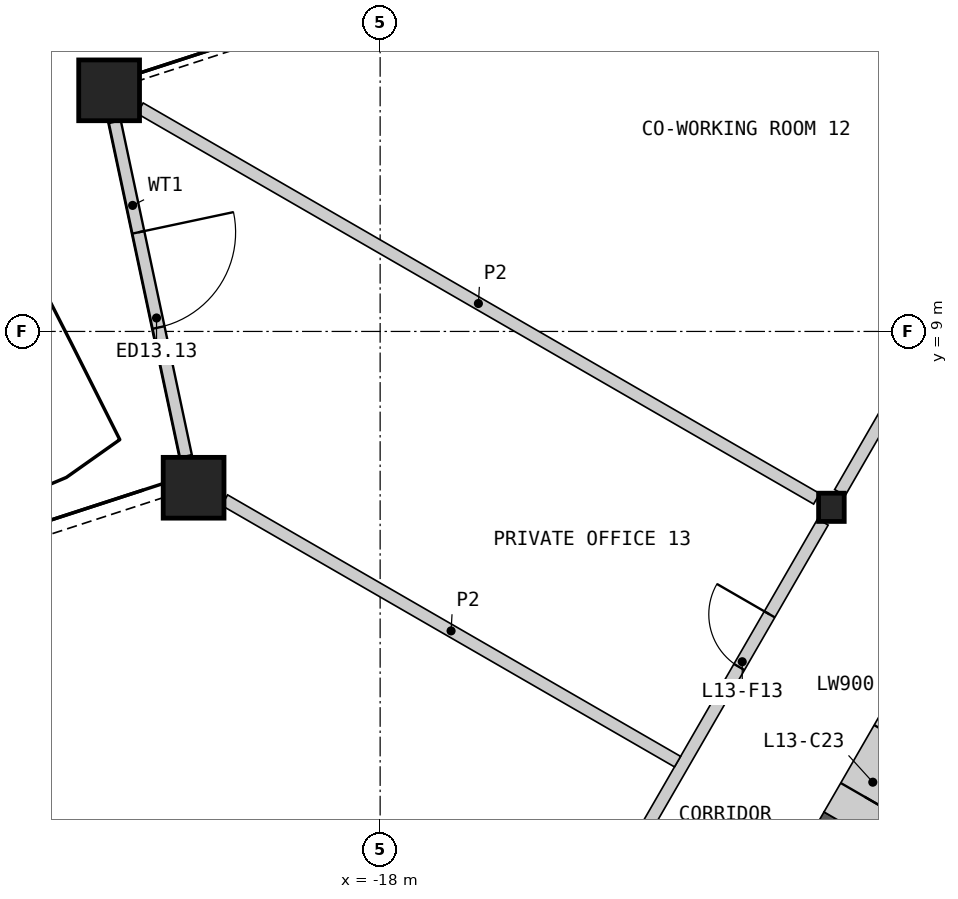
"""IFC4 building model, lengths in metres.
Left out: names, types, materials, properties, quantities, classifications, styles, units other than length and angle.
Written with IfcOpenShell. Run it as: python <this file> out.ifc"""

import sys

from ifc_helpers import new_model, si_unit, direction, frame, frame_2d, origin, origin_2d, place, context, subcontext, project, spatial, rectangle, hollow_rectangle, i_section, extrude, element, fill, save


model = new_model("IFC4")
c1 = context("Model", 3, precision=1e-05, world=origin(), true_north=direction((0.0, 1.0)))
c2 = subcontext(c1, "Body", "Model", "MODEL_VIEW")
j1 = project(units=[si_unit("LENGTHUNIT", "METRE"), si_unit("PLANEANGLEUNIT", "RADIAN")], contexts=[c1])
p1 = place(None, origin())
s1 = spatial("IfcSite", under=j1, at=p1, CompositionType="ELEMENT")
p2 = place(p1, origin())
s2 = spatial("IfcBuilding", under=s1, at=p2, CompositionType="ELEMENT")
p3 = place(p2, frame((0.0, 0.0, 63.6)))
s3 = spatial("IfcBuildingStorey", under=s2, at=p3, CompositionType="ELEMENT", Elevation=63.6)
for number, where, z_axis, x_axis in (
    (1, (-22.457, 12.966, 0.0), (0.0, 0.0, 1.0), (1.0, 0.0, 0.0)),
    (2, (-21.068, 6.429, 0.0), (0.0, 0.0, 1.0), (1.0, 0.0, 0.0)),
):
    element("IfcColumn", number, at=place(p3, frame(where, z_axis=z_axis, x_axis=x_axis)), inside=s3, PredefinedType="COLUMN", context=c2, shape_type="SweptSolid", body=[
        extrude(hollow_rectangle(XDim=1.0, YDim=1.0, WallThickness=0.07, at=origin_2d()), origin(), (0.0, 0.0, 1.0), 4.2),
    ])
p4 = place(p3, frame((-10.578, 6.107, 0.0), z_axis=(0.0, 0.0, 1.0), x_axis=(1.0, 0.0, 0.0)))
e3 = element("IfcColumn", 3, at=p4, inside=s3, PredefinedType="COLUMN", context=c2, shape_type="SweptSolid", body=[
    extrude(i_section(OverallWidth=0.421, OverallDepth=0.465, WebThickness=0.045, FlangeThickness=0.072, at=origin_2d()), origin(), (0.0, 0.0, 1.0), 4.2),
])
p5 = place(p3, frame((-22.363, 12.449, 0.0), z_axis=(0.0, 0.0, 1.0), x_axis=(0.207901831982, -0.978149696242, 0.0)))
e4 = element("IfcWall", 4, at=p5, inside=s3, PredefinedType="SOLIDWALL", context=c2, shape_type="SweptSolid", body=[
    extrude(rectangle(XDim=5.626, YDim=0.2, at=frame_2d((2.813, 0.0))), origin(), (0.0, 0.0, 1.0), 3.189),
])
p6 = place(p5, frame((1.86, 0.0, 0.0)))
e5 = element("IfcOpeningElement", 5, at=p6, cuts=e4, PredefinedType="OPENING", context=c2, shape_type="SweptSolid", body=[
    extrude(rectangle(XDim=1.6, YDim=2.4, at=frame_2d((0.8, 1.2))), frame((0.0, 0.11, 0.0), z_axis=(0.0, -1.0, 0.0), x_axis=(1.0, 0.0, 0.0)), (0.0, 0.0, 1.0), 0.22),
])
p7 = place(p3, frame((-10.31, 0.872, 0.0), z_axis=(0.0, 0.0, 1.0), x_axis=(-0.499968858743, -0.866043382451, 0.0)))
e6 = element("IfcWall", 6, at=p7, inside=s3, PredefinedType="SHEAR", context=c2, shape_type="SweptSolid", body=[
    extrude(rectangle(XDim=4.546, YDim=0.9, at=frame_2d((2.273, 0.0))), origin(), (0.0, 0.0, 1.0), 3.8),
])
p8 = place(p3, frame((-9.21, 2.777, 0.0), z_axis=(0.0, 0.0, 1.0), x_axis=(-0.500077893725, -0.86598042715, 0.0)))
e7 = element("IfcWall", 7, at=p8, inside=s3, PredefinedType="SHEAR", context=c2, shape_type="SweptSolid", body=[
    extrude(rectangle(XDim=2.2, YDim=0.9, at=frame_2d((1.1, 0.0))), origin(), (0.0, 0.0, 1.0), 3.8),
])
p9 = place(p8, frame((0.55, 0.0, 0.0)))
e8 = element("IfcOpeningElement", 8, at=p9, cuts=e7, PredefinedType="OPENING", context=c2, shape_type="SweptSolid", body=[
    extrude(rectangle(XDim=1.1, YDim=2.1, at=frame_2d((0.55, 1.05))), frame((0.0, 0.46, 0.0), z_axis=(0.0, -1.0, 0.0), x_axis=(1.0, 0.0, 0.0)), (0.0, 0.0, 1.0), 0.92),
])
p10 = place(p3, frame((-10.439, 6.35, 0.0), z_axis=(0.0, 0.0, 1.0), x_axis=(0.50001002959, 0.86601961312, 0.0)))
e9 = element("IfcWall", 9, at=p10, inside=s3, PredefinedType="PARTITIONING", context=c2, shape_type="SweptSolid", body=[
    extrude(rectangle(XDim=10.019, YDim=0.2, at=frame_2d((5.009, 0.0))), origin(), (0.0, 0.0, 1.0), 3.8),
])
p11 = place(p10, frame((4.259, 0.0, 0.0)))
e10 = element("IfcOpeningElement", 10, at=p11, cuts=e9, PredefinedType="OPENING", context=c2, shape_type="SweptSolid", body=[
    extrude(rectangle(XDim=1.0, YDim=2.1, at=frame_2d((0.5, 1.05))), frame((0.0, 0.11, 0.0), z_axis=(0.0, -1.0, 0.0), x_axis=(1.0, 0.0, 0.0)), (0.0, 0.0, 1.0), 0.22),
])
p12 = place(p3, frame((-15.728, -2.811, 0.0), z_axis=(0.0, 0.0, 1.0), x_axis=(0.49999175339, 0.866030164915, 0.0)))
e11 = element("IfcWall", 11, at=p12, inside=s3, PredefinedType="PARTITIONING", context=c2, shape_type="SweptSolid", body=[
    extrude(rectangle(XDim=10.019, YDim=0.2, at=frame_2d((5.009, 0.0))), origin(), (0.0, 0.0, 1.0), 3.8),
])
p13 = place(p12, frame((7.266, 0.0, 0.0)))
e12 = element("IfcOpeningElement", 12, at=p13, cuts=e11, PredefinedType="OPENING", context=c2, shape_type="SweptSolid", body=[
    extrude(rectangle(XDim=1.0, YDim=2.1, at=frame_2d((0.5, 1.05))), frame((0.0, 0.11, 0.0), z_axis=(0.0, -1.0, 0.0), x_axis=(1.0, 0.0, 0.0)), (0.0, 0.0, 1.0), 0.22),
])
p14 = place(p3, frame((-21.947, 12.671, 0.0), z_axis=(0.0, 0.0, 1.0), x_axis=(0.866026729935, -0.499997703033, 0.0)))
e13 = element("IfcWall", 13, at=p14, inside=s3, PredefinedType="PARTITIONING", context=c2, shape_type="SweptSolid", body=[
    extrude(rectangle(XDim=12.848, YDim=0.2, at=frame_2d((6.424, 0.0))), origin(), (0.0, 0.0, 1.0), 2.885),
])
p15 = place(p3, frame((-20.558, 6.225, 0.0), z_axis=(0.0, 0.0, 1.0), x_axis=(0.866031967744, -0.499988630717, 0.0)))
e14 = element("IfcWall", 14, at=p15, inside=s3, PredefinedType="PARTITIONING", context=c2, shape_type="SweptSolid", body=[
    extrude(rectangle(XDim=8.601, YDim=0.2, at=frame_2d((4.301, 0.0))), origin(), (0.0, 0.0, 1.0), 2.885),
])
p16 = place(p6, origin())
e15 = element("IfcDoor", 15, at=p16, inside=s3, OperationType="DOUBLE_DOOR_SINGLE_SWING", PredefinedType="DOOR", context=c2, shape_type="SweptSolid", body=[
    extrude(rectangle(XDim=1.6, YDim=2.4, at=frame_2d((0.8, 1.2))), frame((0.0, 0.025, 0.0), z_axis=(0.0, -1.0, 0.0), x_axis=(1.0, 0.0, 0.0)), (0.0, 0.0, 1.0), 0.05),
])
fill(e5, e15)
p17 = place(p9, origin())
e16 = element("IfcDoor", 16, at=p17, inside=s3, OperationType="SINGLE_SWING_RIGHT", PredefinedType="DOOR", context=c2, shape_type="SweptSolid", body=[
    extrude(rectangle(XDim=1.1, YDim=2.1, at=frame_2d((0.55, 1.05))), frame((0.0, 0.205, 0.0), z_axis=(0.0, -1.0, 0.0), x_axis=(1.0, 0.0, 0.0)), (0.0, 0.0, 1.0), 0.05),
])
fill(e8, e16)
p18 = place(p13, origin())
e17 = element("IfcDoor", 17, at=p18, inside=s3, OperationType="SINGLE_SWING_RIGHT", PredefinedType="DOOR", context=c2, shape_type="SweptSolid", body=[
    extrude(rectangle(XDim=1.0, YDim=2.1, at=frame_2d((0.5, 1.05))), frame((0.0, 0.025, 0.0), z_axis=(0.0, -1.0, 0.0), x_axis=(1.0, 0.0, 0.0)), (0.0, 0.0, 1.0), 0.05),
])
fill(e12, e17)
save(model, sys.argv[1])
